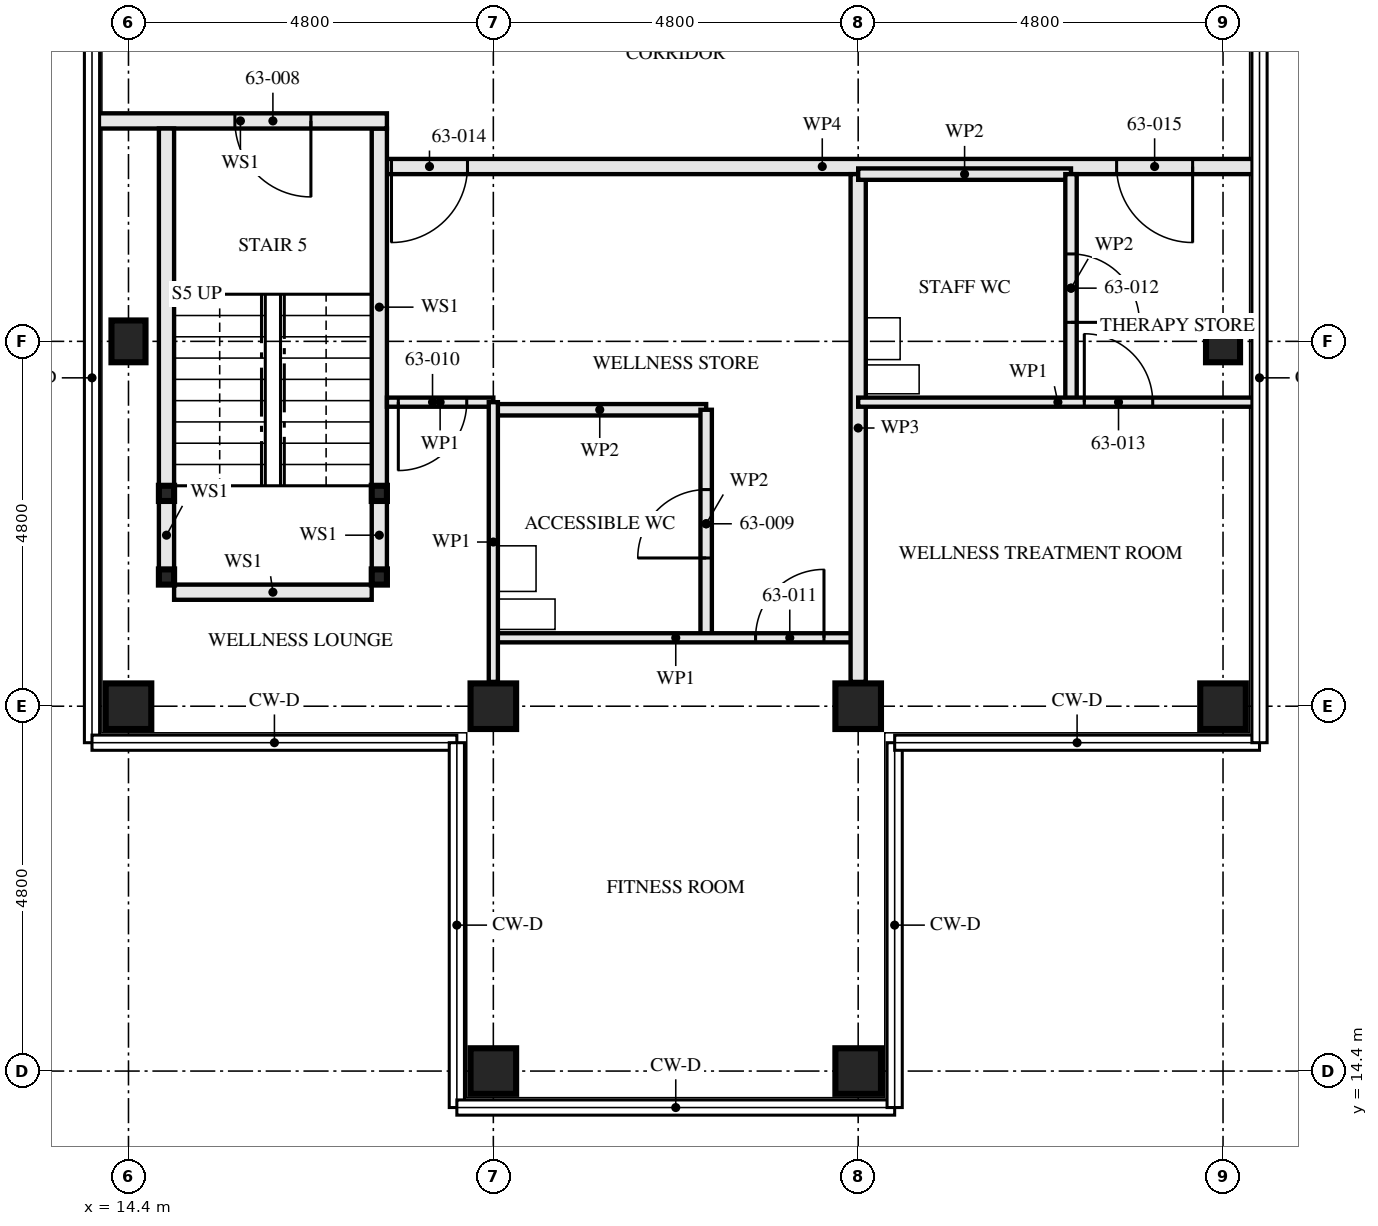
"""IFC4 building model, lengths in metres.
Left out: names, types, materials, properties, quantities, classifications, styles, units other than length and angle.
Written with IfcOpenShell. Run it as: python <this file> out.ifc"""

import sys

from ifc_helpers import new_model, si_unit, direction, frame, frame_2d, origin, origin_2d, place, context, subcontext, project, spatial, rectangle, hollow_rectangle, i_section, extrude, element, fill, save


model = new_model("IFC4")
c1 = context("Model", 3, precision=1e-05, world=origin(), true_north=direction((0.0, 1.0)))
c2 = subcontext(c1, "Body", "Model", "MODEL_VIEW")
j1 = project(units=[si_unit("LENGTHUNIT", "METRE"), si_unit("PLANEANGLEUNIT", "RADIAN")], contexts=[c1])
p1 = place(None, origin())
s1 = spatial("IfcSite", under=j1, at=p1, CompositionType="ELEMENT")
p2 = place(p1, origin())
s2 = spatial("IfcBuilding", under=s1, at=p2, CompositionType="ELEMENT")
p3 = place(p2, frame((0.0, 0.0, 229.5)))
s3 = spatial("IfcBuildingStorey", under=s2, at=p3, CompositionType="ELEMENT", Elevation=229.5)
p4 = place(p3, frame((14.4, 19.2, 0.0), z_axis=(0.0, 0.0, 1.0), x_axis=(0.0, 1.0, 0.0)))
e1 = element("IfcColumn", 1, at=p4, inside=s3, PredefinedType="COLUMN", context=c2, shape_type="SweptSolid", body=[
    extrude(hollow_rectangle(XDim=0.6, YDim=0.6, WallThickness=0.05, at=origin_2d()), origin(), (0.0, 0.0, 1.0), 3.5),
])
p5 = place(p3, frame((14.4, 24.0, 0.0), z_axis=(0.0, 0.0, 1.0), x_axis=(1.0, 0.0, 0.0)))
e2 = element("IfcColumn", 2, at=p5, inside=s3, PredefinedType="COLUMN", context=c2, shape_type="SweptSolid", body=[
    extrude(i_section(OverallWidth=0.448, OverallDepth=0.55, WebThickness=0.072, FlangeThickness=0.115, FilletRadius=0.015, at=origin_2d()), origin(), (0.0, 0.0, 1.0), 3.5),
])
for number, where, z_axis, x_axis in (
    (3, (19.2, 14.4, 0.0), (0.0, 0.0, 1.0), (0.0, 1.0, 0.0)),
    (4, (19.2, 19.2, 0.0), (0.0, 0.0, 1.0), (0.0, 1.0, 0.0)),
    (5, (24.0, 14.4, 0.0), (0.0, 0.0, 1.0), (0.0, 1.0, 0.0)),
    (6, (24.0, 19.2, 0.0), (0.0, 0.0, 1.0), (0.0, 1.0, 0.0)),
    (7, (28.8, 19.2, 0.0), (0.0, 0.0, 1.0), (0.0, 1.0, 0.0)),
):
    element("IfcColumn", number, at=place(p3, frame(where, z_axis=z_axis, x_axis=x_axis)), inside=s3, PredefinedType="COLUMN", context=c2, shape_type="SweptSolid", body=[
        extrude(hollow_rectangle(XDim=0.6, YDim=0.6, WallThickness=0.05, at=origin_2d()), origin(), (0.0, 0.0, 1.0), 3.5),
    ])
p6 = place(p3, frame((28.8, 24.0, 0.0), z_axis=(0.0, 0.0, 1.0), x_axis=(1.0, 0.0, 0.0)))
e8 = element("IfcColumn", 8, at=p6, inside=s3, PredefinedType="COLUMN", context=c2, shape_type="SweptSolid", body=[
    extrude(i_section(OverallWidth=0.448, OverallDepth=0.55, WebThickness=0.072, FlangeThickness=0.115, FilletRadius=0.015, at=origin_2d()), origin(), (0.0, 0.0, 1.0), 3.5),
])
for number, where, z_axis, x_axis in (
    (9, (14.9, 20.9, 0.0), (0.0, 0.0, 1.0), (1.0, 0.0, 0.0)),
    (10, (17.7, 20.9, 0.0), (0.0, 0.0, 1.0), (1.0, 0.0, 0.0)),
    (11, (14.9, 22.0, 0.0), (0.0, 0.0, 1.0), (1.0, 0.0, 0.0)),
    (12, (17.7, 22.0, 0.0), (0.0, 0.0, 1.0), (1.0, 0.0, 0.0)),
):
    element("IfcColumn", number, at=place(p3, frame(where, z_axis=z_axis, x_axis=x_axis)), inside=s3, PredefinedType="COLUMN", context=c2, shape_type="SweptSolid", body=[
        extrude(hollow_rectangle(XDim=0.2, YDim=0.2, WallThickness=0.008, at=origin_2d()), origin(), (0.0, 0.0, 1.0), 3.33),
    ])
p7 = place(p3, frame((14.9, 21.0, 0.0), z_axis=(0.0, 0.0, 1.0), x_axis=(0.0, 1.0, 0.0)))
e13 = element("IfcWall", 13, at=p7, inside=s3, PredefinedType="SOLIDWALL", context=c2, shape_type="SweptSolid", body=[
    extrude(rectangle(XDim=0.9, YDim=0.2, at=frame_2d((0.45, 0.0))), origin(), (0.0, 0.0, 1.0), 2.99),
])
p8 = place(p3, frame((14.9, 22.1, 0.0), z_axis=(0.0, 0.0, 1.0), x_axis=(0.0, 1.0, 0.0)))
e14 = element("IfcWall", 14, at=p8, inside=s3, PredefinedType="SOLIDWALL", context=c2, shape_type="SweptSolid", body=[
    extrude(rectangle(XDim=4.7, YDim=0.2, at=frame_2d((2.35, 0.0))), origin(), (0.0, 0.0, 1.0), 2.99),
])
p9 = place(p3, frame((17.7, 21.0, 0.0), z_axis=(0.0, 0.0, 1.0), x_axis=(0.0, 1.0, 0.0)))
e15 = element("IfcWall", 15, at=p9, inside=s3, PredefinedType="SOLIDWALL", context=c2, shape_type="SweptSolid", body=[
    extrude(rectangle(XDim=0.9, YDim=0.2, at=frame_2d((0.45, 0.0))), origin(), (0.0, 0.0, 1.0), 2.99),
])
p10 = place(p3, frame((17.7, 22.1, 0.0), z_axis=(0.0, 0.0, 1.0), x_axis=(0.0, 1.0, 0.0)))
e16 = element("IfcWall", 16, at=p10, inside=s3, PredefinedType="SOLIDWALL", context=c2, shape_type="SweptSolid", body=[
    extrude(rectangle(XDim=4.7, YDim=0.2, at=frame_2d((2.35, 0.0))), origin(), (0.0, 0.0, 1.0), 2.99),
])
p11 = place(p3, frame((15.0, 20.7, 0.0), z_axis=(0.0, 0.0, 1.0), x_axis=(1.0, 0.0, 0.0)))
e17 = element("IfcWall", 17, at=p11, inside=s3, PredefinedType="SOLIDWALL", context=c2, shape_type="SweptSolid", body=[
    extrude(rectangle(XDim=2.6, YDim=0.2, at=frame_2d((1.3, 0.0))), origin(), (0.0, 0.0, 1.0), 3.33),
])
p12 = place(p3, frame((13.945, 26.9, 0.0), z_axis=(0.0, 0.0, 1.0), x_axis=(1.0, 0.0, 0.0)))
e18 = element("IfcWall", 18, at=p12, inside=s3, PredefinedType="SOLIDWALL", context=c2, shape_type="SweptSolid", body=[
    extrude(rectangle(XDim=3.855, YDim=0.2, at=frame_2d((1.927, 0.0))), origin(), (0.0, 0.0, 1.0), 2.32),
])
p13 = place(p12, frame((1.855, 0.0, 0.0)))
e19 = element("IfcOpeningElement", 19, at=p13, cuts=e18, PredefinedType="OPENING", context=c2, shape_type="SweptSolid", body=[
    extrude(rectangle(XDim=1.0, YDim=2.1, at=frame_2d((0.5, 1.05))), frame((0.0, 0.111, 0.0), z_axis=(0.0, -1.0, 0.0), x_axis=(1.0, 0.0, 0.0)), (0.0, 0.0, 1.0), 0.221),
])
p14 = place(p3, frame((22.0, 20.1, 0.0), z_axis=(0.0, 0.0, 1.0), x_axis=(0.0, 1.0, 0.0)))
e20 = element("IfcWall", 20, at=p14, inside=s3, PredefinedType="PARTITIONING", context=c2, shape_type="SweptSolid", body=[
    extrude(rectangle(XDim=3.0, YDim=0.15, at=frame_2d((1.5, 0.0))), origin(), (0.0, 0.0, 1.0), 3.33),
])
p15 = place(p14, frame((1.05, 0.0, 0.0)))
e21 = element("IfcOpeningElement", 21, at=p15, cuts=e20, PredefinedType="OPENING", context=c2, shape_type="SweptSolid", body=[
    extrude(rectangle(XDim=0.9, YDim=2.1, at=frame_2d((0.45, 1.05))), frame((0.0, 0.085, 0.0), z_axis=(0.0, -1.0, 0.0), x_axis=(1.0, 0.0, 0.0)), (0.0, 0.0, 1.0), 0.171),
])
p16 = place(p3, frame((19.2, 23.1, 0.0), z_axis=(0.0, 0.0, 1.0), x_axis=(1.0, 0.0, 0.0)))
e22 = element("IfcWall", 22, at=p16, inside=s3, PredefinedType="PARTITIONING", context=c2, shape_type="SweptSolid", body=[
    extrude(rectangle(XDim=2.8, YDim=0.15, at=frame_2d((1.4, 0.0))), origin(), (0.0, 0.0, 1.0), 3.33),
])
p17 = place(p3, frame((17.8, 23.2, 0.0), z_axis=(0.0, 0.0, 1.0), x_axis=(1.0, 0.0, 0.0)))
e23 = element("IfcWall", 23, at=p17, inside=s3, PredefinedType="PARTITIONING", context=c2, shape_type="SweptSolid", body=[
    extrude(rectangle(XDim=1.4, YDim=0.12, at=frame_2d((0.7, 0.0))), origin(), (0.0, 0.0, 1.0), 3.33),
])
p18 = place(p17, frame((0.15, 0.0, 0.0)))
e24 = element("IfcOpeningElement", 24, at=p18, cuts=e23, PredefinedType="OPENING", context=c2, shape_type="SweptSolid", body=[
    extrude(rectangle(XDim=0.9, YDim=2.1, at=frame_2d((0.45, 1.05))), frame((0.0, 0.071, 0.0), z_axis=(0.0, -1.0, 0.0), x_axis=(1.0, 0.0, 0.0)), (0.0, 0.0, 1.0), 0.141),
])
p19 = place(p3, frame((19.2, 20.1, 0.0), z_axis=(0.0, 0.0, 1.0), x_axis=(1.0, 0.0, 0.0)))
e25 = element("IfcWall", 25, at=p19, inside=s3, PredefinedType="PARTITIONING", context=c2, shape_type="SweptSolid", body=[
    extrude(rectangle(XDim=4.8, YDim=0.12, at=frame_2d((2.4, 0.0))), origin(), (0.0, 0.0, 1.0), 3.33),
])
p20 = place(p19, frame((3.45, 0.0, 0.0)))
e26 = element("IfcOpeningElement", 26, at=p20, cuts=e25, PredefinedType="OPENING", context=c2, shape_type="SweptSolid", body=[
    extrude(rectangle(XDim=0.9, YDim=2.1, at=frame_2d((0.45, 1.05))), frame((0.0, 0.071, 0.0), z_axis=(0.0, -1.0, 0.0), x_axis=(1.0, 0.0, 0.0)), (0.0, 0.0, 1.0), 0.141),
])
p21 = place(p3, frame((19.2, 19.52, 0.0), z_axis=(0.0, 0.0, 1.0), x_axis=(0.0, 1.0, 0.0)))
e27 = element("IfcWall", 27, at=p21, inside=s3, PredefinedType="PARTITIONING", context=c2, shape_type="SweptSolid", body=[
    extrude(rectangle(XDim=3.68, YDim=0.12, at=frame_2d((1.84, 0.0))), origin(), (0.0, 0.0, 1.0), 2.55),
])
p22 = place(p3, frame((24.0, 19.52, 0.0), z_axis=(0.0, 0.0, 1.0), x_axis=(0.0, 1.0, 0.0)))
e28 = element("IfcWall", 28, at=p22, inside=s3, PredefinedType="PARTITIONING", context=c2, shape_type="SweptSolid", body=[
    extrude(rectangle(XDim=6.68, YDim=0.2, at=frame_2d((3.34, 0.0))), origin(), (0.0, 0.0, 1.0), 2.55),
])
p23 = place(p3, frame((26.8, 23.2, 0.0), z_axis=(0.0, 0.0, 1.0), x_axis=(0.0, 1.0, 0.0)))
e29 = element("IfcWall", 29, at=p23, inside=s3, PredefinedType="PARTITIONING", context=c2, shape_type="SweptSolid", body=[
    extrude(rectangle(XDim=3.0, YDim=0.15, at=frame_2d((1.5, 0.0))), origin(), (0.0, 0.0, 1.0), 2.55),
])
p24 = place(p23, frame((1.05, 0.0, 0.0)))
e30 = element("IfcOpeningElement", 30, at=p24, cuts=e29, PredefinedType="OPENING", context=c2, shape_type="SweptSolid", body=[
    extrude(rectangle(XDim=0.9, YDim=2.1, at=frame_2d((0.45, 1.05))), frame((0.0, 0.085, 0.0), z_axis=(0.0, -1.0, 0.0), x_axis=(1.0, 0.0, 0.0)), (0.0, 0.0, 1.0), 0.171),
])
p25 = place(p3, frame((24.0, 26.2, 0.0), z_axis=(0.0, 0.0, 1.0), x_axis=(1.0, 0.0, 0.0)))
e31 = element("IfcWall", 31, at=p25, inside=s3, PredefinedType="PARTITIONING", context=c2, shape_type="SweptSolid", body=[
    extrude(rectangle(XDim=2.8, YDim=0.15, at=frame_2d((1.4, 0.0))), origin(), (0.0, 0.0, 1.0), 3.33),
])
p26 = place(p3, frame((24.0, 23.2, 0.0), z_axis=(0.0, 0.0, 1.0), x_axis=(1.0, 0.0, 0.0)))
e32 = element("IfcWall", 32, at=p26, inside=s3, PredefinedType="PARTITIONING", context=c2, shape_type="SweptSolid", body=[
    extrude(rectangle(XDim=5.255, YDim=0.12, at=frame_2d((2.627, 0.0))), origin(), (0.0, 0.0, 1.0), 2.32),
])
p27 = place(p26, frame((2.975, 0.0, 0.0)))
e33 = element("IfcOpeningElement", 33, at=p27, cuts=e32, PredefinedType="OPENING", context=c2, shape_type="SweptSolid", body=[
    extrude(rectangle(XDim=0.9, YDim=2.1, at=frame_2d((0.45, 1.05))), frame((0.0, 0.071, 0.0), z_axis=(0.0, -1.0, 0.0), x_axis=(1.0, 0.0, 0.0)), (0.0, 0.0, 1.0), 0.141),
])
p28 = place(p3, frame((17.8, 26.3, 0.0), z_axis=(0.0, 0.0, 1.0), x_axis=(1.0, 0.0, 0.0)))
e34 = element("IfcWall", 34, at=p28, inside=s3, PredefinedType="PARTITIONING", context=c2, shape_type="SweptSolid", body=[
    extrude(rectangle(XDim=11.455, YDim=0.2, at=frame_2d((5.728, 0.0))), origin(), (0.0, 0.0, 1.0), 2.32),
])
p29 = place(p28, frame((0.06, 0.0, 0.0)))
e35 = element("IfcOpeningElement", 35, at=p29, cuts=e34, PredefinedType="OPENING", context=c2, shape_type="SweptSolid", body=[
    extrude(rectangle(XDim=1.0, YDim=2.1, at=frame_2d((0.5, 1.05))), frame((0.0, 0.111, 0.0), z_axis=(0.0, -1.0, 0.0), x_axis=(1.0, 0.0, 0.0)), (0.0, 0.0, 1.0), 0.221),
])
p30 = place(p28, frame((9.6, 0.0, 0.0)))
e36 = element("IfcOpeningElement", 36, at=p30, cuts=e34, PredefinedType="OPENING", context=c2, shape_type="SweptSolid", body=[
    extrude(rectangle(XDim=1.0, YDim=2.1, at=frame_2d((0.5, 1.05))), frame((0.0, 0.111, 0.0), z_axis=(0.0, -1.0, 0.0), x_axis=(1.0, 0.0, 0.0)), (0.0, 0.0, 1.0), 0.221),
])
p31 = place(p13, frame((1.0, 0.0, 0.0), z_axis=(0.0, 0.0, 1.0), x_axis=(-1.0, 0.0, 0.0)))
e37 = element("IfcDoor", 37, at=p31, inside=s3, OperationType="SINGLE_SWING_RIGHT", PredefinedType="DOOR", context=c2, shape_type="SweptSolid", body=[
    extrude(rectangle(XDim=1.0, YDim=2.1, at=frame_2d((0.5, 1.05))), frame((0.0, 0.032, 0.0), z_axis=(0.0, -1.0, 0.0), x_axis=(1.0, 0.0, 0.0)), (0.0, 0.0, 1.0), 0.064),
])
fill(e19, e37)
p32 = place(p15, origin())
e38 = element("IfcDoor", 38, at=p32, inside=s3, OperationType="SINGLE_SWING_RIGHT", PredefinedType="DOOR", context=c2, shape_type="SweptSolid", body=[
    extrude(rectangle(XDim=0.9, YDim=2.1, at=frame_2d((0.45, 1.05))), frame((0.0, 0.022, 0.0), z_axis=(0.0, -1.0, 0.0), x_axis=(1.0, 0.0, 0.0)), (0.0, 0.0, 1.0), 0.044),
])
fill(e21, e38)
p33 = place(p18, frame((0.9, 0.0, 0.0), z_axis=(0.0, 0.0, 1.0), x_axis=(-1.0, 0.0, 0.0)))
e39 = element("IfcDoor", 39, at=p33, inside=s3, OperationType="SINGLE_SWING_LEFT", PredefinedType="DOOR", context=c2, shape_type="SweptSolid", body=[
    extrude(rectangle(XDim=0.9, YDim=2.1, at=frame_2d((0.45, 1.05))), frame((0.0, 0.022, 0.0), z_axis=(0.0, -1.0, 0.0), x_axis=(1.0, 0.0, 0.0)), (0.0, 0.0, 1.0), 0.044),
])
fill(e24, e39)
p34 = place(p20, origin())
e40 = element("IfcDoor", 40, at=p34, inside=s3, OperationType="SINGLE_SWING_LEFT", PredefinedType="DOOR", context=c2, shape_type="SweptSolid", body=[
    extrude(rectangle(XDim=0.9, YDim=2.1, at=frame_2d((0.45, 1.05))), frame((0.0, 0.022, 0.0), z_axis=(0.0, -1.0, 0.0), x_axis=(1.0, 0.0, 0.0)), (0.0, 0.0, 1.0), 0.044),
])
fill(e26, e40)
p35 = place(p24, frame((0.9, 0.0, 0.0), z_axis=(0.0, 0.0, 1.0), x_axis=(-1.0, 0.0, 0.0)))
e41 = element("IfcDoor", 41, at=p35, inside=s3, OperationType="SINGLE_SWING_LEFT", PredefinedType="DOOR", context=c2, shape_type="SweptSolid", body=[
    extrude(rectangle(XDim=0.9, YDim=2.1, at=frame_2d((0.45, 1.05))), frame((0.0, 0.022, 0.0), z_axis=(0.0, -1.0, 0.0), x_axis=(1.0, 0.0, 0.0)), (0.0, 0.0, 1.0), 0.044),
])
fill(e30, e41)
p36 = place(p27, origin())
e42 = element("IfcDoor", 42, at=p36, inside=s3, OperationType="SINGLE_SWING_RIGHT", PredefinedType="DOOR", context=c2, shape_type="SweptSolid", body=[
    extrude(rectangle(XDim=0.9, YDim=2.1, at=frame_2d((0.45, 1.05))), frame((0.0, 0.022, 0.0), z_axis=(0.0, -1.0, 0.0), x_axis=(1.0, 0.0, 0.0)), (0.0, 0.0, 1.0), 0.044),
])
fill(e33, e42)
p37 = place(p29, frame((1.0, 0.0, 0.0), z_axis=(0.0, 0.0, 1.0), x_axis=(-1.0, 0.0, 0.0)))
e43 = element("IfcDoor", 43, at=p37, inside=s3, OperationType="SINGLE_SWING_LEFT", PredefinedType="DOOR", context=c2, shape_type="SweptSolid", body=[
    extrude(rectangle(XDim=1.0, YDim=2.1, at=frame_2d((0.5, 1.05))), frame((0.0, 0.027, 0.0), z_axis=(0.0, -1.0, 0.0), x_axis=(1.0, 0.0, 0.0)), (0.0, 0.0, 1.0), 0.054),
])
fill(e35, e43)
p38 = place(p30, frame((1.0, 0.0, 0.0), z_axis=(0.0, 0.0, 1.0), x_axis=(-1.0, 0.0, 0.0)))
e44 = element("IfcDoor", 44, at=p38, inside=s3, OperationType="SINGLE_SWING_RIGHT", PredefinedType="DOOR", context=c2, shape_type="SweptSolid", body=[
    extrude(rectangle(XDim=1.0, YDim=2.1, at=frame_2d((0.5, 1.05))), frame((0.0, 0.027, 0.0), z_axis=(0.0, -1.0, 0.0), x_axis=(1.0, 0.0, 0.0)), (0.0, 0.0, 1.0), 0.054),
])
fill(e36, e44)
save(model, sys.argv[1])
